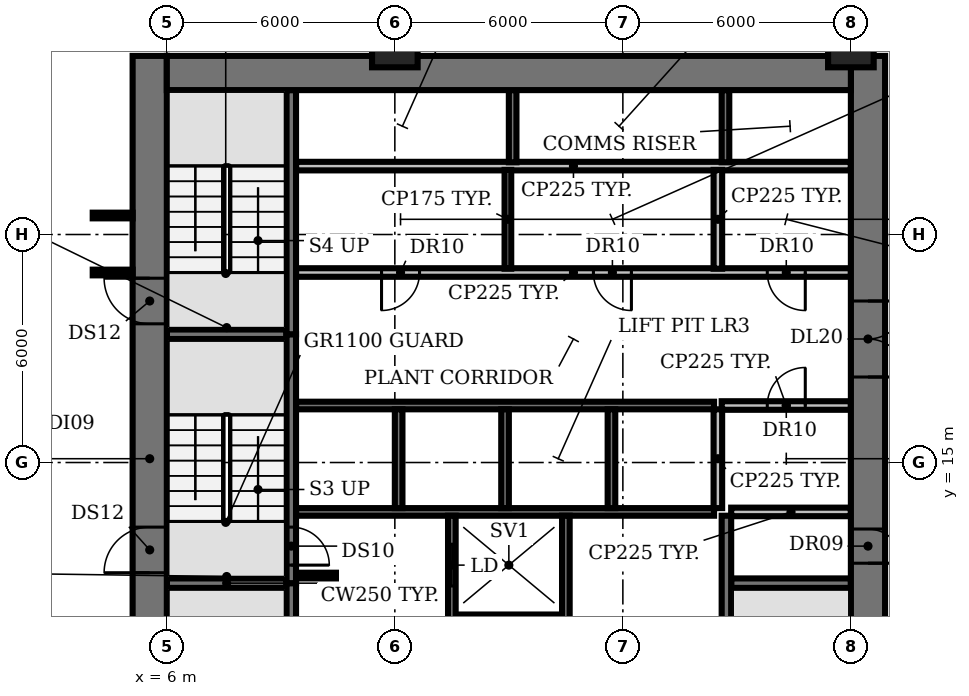
"""IFC4 building model, lengths in metres.
Left out: names, types, materials, properties, quantities, classifications, styles, units other than length and angle.
Written with IfcOpenShell. Run it as: python <this file> out.ifc"""

import sys

from ifc_helpers import new_model, si_unit, direction, frame, frame_2d, origin, origin_2d, place, context, subcontext, project, spatial, rectangle, extrude, element, fill, save


model = new_model("IFC4")
c1 = context("Model", 3, precision=1e-05, world=origin(), true_north=direction((0.0, 1.0)))
c2 = subcontext(c1, "Body", "Model", "MODEL_VIEW")
j1 = project(units=[si_unit("LENGTHUNIT", "METRE"), si_unit("PLANEANGLEUNIT", "RADIAN")], contexts=[c1])
p1 = place(None, origin())
s1 = spatial("IfcSite", under=j1, at=p1, CompositionType="ELEMENT")
p2 = place(p1, origin())
s2 = spatial("IfcBuilding", under=s1, at=p2, CompositionType="ELEMENT")
p3 = place(p2, frame((0.0, 0.0, -6.0)))
s3 = spatial("IfcBuildingStorey", under=s2, at=p3, CompositionType="ELEMENT", Elevation=-6.0)
for number, where, z_axis, x_axis in (
    (1, (12.0, 26.0, -0.3), (0.0, 0.0, 1.0), (1.0, 0.0, 0.0)),
    (2, (24.0, 26.0, -0.3), (0.0, 0.0, 1.0), (1.0, 0.0, 0.0)),
):
    element("IfcColumn", number, at=place(p3, frame(where, z_axis=z_axis, x_axis=x_axis)), inside=s3, PredefinedType="COLUMN", context=c2, shape_type="SweptSolid", body=[
        extrude(rectangle(XDim=1.2, YDim=1.2, at=origin_2d()), origin(), (0.0, 0.0, 1.0), 5.95),
    ])
p4 = place(p3, frame((13.6, 10.9, 0.0), z_axis=(0.0, 0.0, 1.0), x_axis=(1.0, 0.0, 0.0)))
e3 = element("IfcWall", 3, at=p4, inside=s3, PredefinedType="SHEAR", context=c2, shape_type="SweptSolid", body=[
    extrude(rectangle(XDim=2.8, YDim=0.2, at=frame_2d((1.4, 0.0))), origin(), (0.0, 0.0, 1.0), 5.65),
])
for number, where, z_axis, x_axis in (
    (4, (6.0, 11.825, 0.0), (0.0, 0.0, 1.0), (1.0, 0.0, 0.0)),
    (5, (20.85, 11.825, 0.0), (0.0, 0.0, 1.0), (1.0, 0.0, 0.0)),
):
    element("IfcWall", number, at=place(p3, frame(where, z_axis=z_axis, x_axis=x_axis)), inside=s3, PredefinedType="SHEAR", context=c2, shape_type="SweptSolid", body=[
        extrude(rectangle(XDim=3.15, YDim=0.25, at=frame_2d((1.575, 0.0))), origin(), (0.0, 0.0, 1.0), 5.65),
    ])
p5 = place(p3, frame((9.4, 12.025, 0.0), z_axis=(0.0, 0.0, 1.0), x_axis=(1.0, 0.0, 0.0)))
e6 = element("IfcWall", 6, at=p5, inside=s3, PredefinedType="SHEAR", context=c2, shape_type="SweptSolid", body=[
    extrude(rectangle(XDim=1.05, YDim=0.15, at=frame_2d((0.525, 0.0))), origin(), (0.0, 0.0, 1.0), 5.65),
])
p6 = place(p3, frame((9.4, 13.7, 0.0), z_axis=(0.0, 0.0, 1.0), x_axis=(1.0, 0.0, 0.0)))
e7 = element("IfcWall", 7, at=p6, inside=s3, PredefinedType="SHEAR", context=c2, shape_type="SweptSolid", body=[
    extrude(rectangle(XDim=11.0, YDim=0.2, at=frame_2d((5.5, 0.0))), origin(), (0.0, 0.0, 1.0), 5.65),
])
p7 = place(p3, frame((20.85, 13.7, 0.0), z_axis=(0.0, 0.0, 1.0), x_axis=(1.0, 0.0, 0.0)))
e8 = element("IfcWall", 8, at=p7, inside=s3, PredefinedType="PARTITIONING", context=c2, shape_type="SweptSolid", body=[
    extrude(rectangle(XDim=3.15, YDim=0.225, at=frame_2d((1.575, 0.0))), origin(), (0.0, 0.0, 1.0), 5.65),
])
p8 = place(p3, frame((9.4, 16.5, 0.0), z_axis=(0.0, 0.0, 1.0), x_axis=(1.0, 0.0, 0.0)))
e9 = element("IfcWall", 9, at=p8, inside=s3, PredefinedType="SHEAR", context=c2, shape_type="SweptSolid", body=[
    extrude(rectangle(XDim=11.0, YDim=0.2, at=frame_2d((5.5, 0.0))), origin(), (0.0, 0.0, 1.0), 5.65),
])
p9 = place(p3, frame((20.6, 16.5, 0.0), z_axis=(0.0, 0.0, 1.0), x_axis=(1.0, 0.0, 0.0)))
e10 = element("IfcWall", 10, at=p9, inside=s3, PredefinedType="PARTITIONING", context=c2, shape_type="SweptSolid", body=[
    extrude(rectangle(XDim=3.4, YDim=0.225, at=frame_2d((1.7, 0.0))), origin(), (0.0, 0.0, 1.0), 5.65),
])
p10 = place(p9, frame((1.2, 0.0, 0.0)))
e11 = element("IfcOpeningElement", 11, at=p10, cuts=e10, PredefinedType="OPENING", context=c2, shape_type="SweptSolid", body=[
    extrude(rectangle(XDim=1.0, YDim=2.1, at=frame_2d((0.5, 1.05))), frame((0.0, 0.123, 0.0), z_axis=(0.0, -1.0, 0.0), x_axis=(1.0, 0.0, 0.0)), (0.0, 0.0, 1.0), 0.245),
])
p11 = place(p3, frame((6.0, 18.375, 0.0), z_axis=(0.0, 0.0, 1.0), x_axis=(1.0, 0.0, 0.0)))
e12 = element("IfcWall", 12, at=p11, inside=s3, PredefinedType="SHEAR", context=c2, shape_type="SweptSolid", body=[
    extrude(rectangle(XDim=3.15, YDim=0.25, at=frame_2d((1.575, 0.0))), origin(), (0.0, 0.0, 1.0), 5.65),
])
p12 = place(p3, frame((24.0, 20.0, 0.0), z_axis=(0.0, 0.0, 1.0), x_axis=(-1.0, 0.0, 0.0)))
e13 = element("IfcWall", 13, at=p12, inside=s3, PredefinedType="PARTITIONING", context=c2, shape_type="SweptSolid", body=[
    extrude(rectangle(XDim=14.6, YDim=0.225, at=frame_2d((7.3, 0.0))), origin(), (0.0, 0.0, 1.0), 5.65),
])
p13 = place(p12, frame((11.35, 0.0, 0.0)))
e14 = element("IfcOpeningElement", 14, at=p13, cuts=e13, PredefinedType="OPENING", context=c2, shape_type="SweptSolid", body=[
    extrude(rectangle(XDim=1.0, YDim=2.1, at=frame_2d((0.5, 1.05))), frame((0.0, 0.123, 0.0), z_axis=(0.0, -1.0, 0.0), x_axis=(1.0, 0.0, 0.0)), (0.0, 0.0, 1.0), 0.245),
])
p14 = place(p12, frame((5.775, 0.0, 0.0)))
e15 = element("IfcOpeningElement", 15, at=p14, cuts=e13, PredefinedType="OPENING", context=c2, shape_type="SweptSolid", body=[
    extrude(rectangle(XDim=1.0, YDim=2.1, at=frame_2d((0.5, 1.05))), frame((0.0, 0.123, 0.0), z_axis=(0.0, -1.0, 0.0), x_axis=(1.0, 0.0, 0.0)), (0.0, 0.0, 1.0), 0.245),
])
p15 = place(p12, frame((1.2, 0.0, 0.0)))
e16 = element("IfcOpeningElement", 16, at=p15, cuts=e13, PredefinedType="OPENING", context=c2, shape_type="SweptSolid", body=[
    extrude(rectangle(XDim=1.0, YDim=2.1, at=frame_2d((0.5, 1.05))), frame((0.0, 0.123, 0.0), z_axis=(0.0, -1.0, 0.0), x_axis=(1.0, 0.0, 0.0)), (0.0, 0.0, 1.0), 0.245),
])
p16 = place(p3, frame((9.4, 22.8, 0.0), z_axis=(0.0, 0.0, 1.0), x_axis=(1.0, 0.0, 0.0)))
e17 = element("IfcWall", 17, at=p16, inside=s3, PredefinedType="PARTITIONING", context=c2, shape_type="SweptSolid", body=[
    extrude(rectangle(XDim=14.6, YDim=0.225, at=frame_2d((7.3, 0.0))), origin(), (0.0, 0.0, 1.0), 5.65),
])
p17 = place(p3, frame((9.275, 11.825, 0.0), z_axis=(0.0, 0.0, 1.0), x_axis=(0.0, -1.0, 0.0)))
e18 = element("IfcWall", 18, at=p17, inside=s3, PredefinedType="SHEAR", context=c2, shape_type="SweptSolid", body=[
    extrude(rectangle(XDim=6.425, YDim=0.25, at=frame_2d((3.212, 0.0))), origin(), (0.0, 0.0, 1.0), 5.65),
])
p18 = place(p17, frame((5.075, 0.0, 0.0)))
e19 = element("IfcOpeningElement", 19, at=p18, cuts=e18, PredefinedType="OPENING", context=c2, shape_type="SweptSolid", body=[
    extrude(rectangle(XDim=1.0, YDim=2.1, at=frame_2d((0.5, 1.05))), frame((0.0, 0.135, 0.0), z_axis=(0.0, -1.0, 0.0), x_axis=(1.0, 0.0, 0.0)), (0.0, 0.0, 1.0), 0.27),
])
p19 = place(p3, frame((9.275, 18.375, 0.0), z_axis=(0.0, 0.0, 1.0), x_axis=(0.0, -1.0, 0.0)))
e20 = element("IfcWall", 20, at=p19, inside=s3, PredefinedType="SHEAR", context=c2, shape_type="SweptSolid", body=[
    extrude(rectangle(XDim=6.55, YDim=0.25, at=frame_2d((3.275, 0.0))), origin(), (0.0, 0.0, 1.0), 5.65),
])
p20 = place(p19, frame((5.075, 0.0, 0.0)))
e21 = element("IfcOpeningElement", 21, at=p20, cuts=e20, PredefinedType="OPENING", context=c2, shape_type="SweptSolid", body=[
    extrude(rectangle(XDim=1.0, YDim=2.1, at=frame_2d((0.5, 1.05))), frame((0.0, 0.135, 0.0), z_axis=(0.0, -1.0, 0.0), x_axis=(1.0, 0.0, 0.0)), (0.0, 0.0, 1.0), 0.27),
])
p21 = place(p3, frame((9.275, 18.375, 0.0), z_axis=(0.0, 0.0, 1.0), x_axis=(0.0, 1.0, 0.0)))
e22 = element("IfcWall", 22, at=p21, inside=s3, PredefinedType="SHEAR", context=c2, shape_type="SweptSolid", body=[
    extrude(rectangle(XDim=6.425, YDim=0.25, at=frame_2d((3.212, 0.0))), origin(), (0.0, 0.0, 1.0), 5.65),
])
p22 = place(p3, frame((12.1, 13.8, 0.0), z_axis=(0.0, 0.0, 1.0), x_axis=(0.0, 1.0, 0.0)))
e23 = element("IfcWall", 23, at=p22, inside=s3, PredefinedType="SHEAR", context=c2, shape_type="SweptSolid", body=[
    extrude(rectangle(XDim=2.6, YDim=0.2, at=frame_2d((1.3, 0.0))), origin(), (0.0, 0.0, 1.0), 5.65),
])
p23 = place(p3, frame((13.5, 5.4, 0.0), z_axis=(0.0, 0.0, 1.0), x_axis=(0.0, 1.0, 0.0)))
e24 = element("IfcWall", 24, at=p23, inside=s3, PredefinedType="SHEAR", context=c2, shape_type="SweptSolid", body=[
    extrude(rectangle(XDim=8.2, YDim=0.2, at=frame_2d((4.1, 0.0))), origin(), (0.0, 0.0, 1.0), 5.65),
])
p24 = place(p23, frame((0.75, 0.0, 0.0)))
e25 = element("IfcOpeningElement", 25, at=p24, cuts=e24, PredefinedType="OPENING", context=c2, shape_type="SweptSolid", body=[
    extrude(rectangle(XDim=1.1, YDim=2.1, at=frame_2d((0.55, 1.05))), frame((0.0, 0.11, 0.0), z_axis=(0.0, -1.0, 0.0), x_axis=(1.0, 0.0, 0.0)), (0.0, 0.0, 1.0), 0.22),
])
p25 = place(p23, frame((3.55, 0.0, 0.0)))
e26 = element("IfcOpeningElement", 26, at=p25, cuts=e24, PredefinedType="OPENING", context=c2, shape_type="SweptSolid", body=[
    extrude(rectangle(XDim=1.1, YDim=2.1, at=frame_2d((0.55, 1.05))), frame((0.0, 0.11, 0.0), z_axis=(0.0, -1.0, 0.0), x_axis=(1.0, 0.0, 0.0)), (0.0, 0.0, 1.0), 0.22),
])
p26 = place(p23, frame((6.35, 0.0, 0.0)))
e27 = element("IfcOpeningElement", 27, at=p26, cuts=e24, PredefinedType="OPENING", context=c2, shape_type="SweptSolid", body=[
    extrude(rectangle(XDim=1.1, YDim=2.1, at=frame_2d((0.55, 1.05))), frame((0.0, 0.11, 0.0), z_axis=(0.0, -1.0, 0.0), x_axis=(1.0, 0.0, 0.0)), (0.0, 0.0, 1.0), 0.22),
])
p27 = place(p3, frame((14.9, 13.8, 0.0), z_axis=(0.0, 0.0, 1.0), x_axis=(0.0, 1.0, 0.0)))
e28 = element("IfcWall", 28, at=p27, inside=s3, PredefinedType="SHEAR", context=c2, shape_type="SweptSolid", body=[
    extrude(rectangle(XDim=2.6, YDim=0.2, at=frame_2d((1.3, 0.0))), origin(), (0.0, 0.0, 1.0), 5.65),
])
p28 = place(p3, frame((14.975, 20.1, 0.0), z_axis=(0.0, 0.0, 1.0), x_axis=(0.0, 1.0, 0.0)))
e29 = element("IfcWall", 29, at=p28, inside=s3, PredefinedType="PARTITIONING", context=c2, shape_type="SweptSolid", body=[
    extrude(rectangle(XDim=2.6, YDim=0.175, at=frame_2d((1.3, 0.0))), origin(), (0.0, 0.0, 1.0), 5.65),
])
p29 = place(p3, frame((15.1, 22.9, 0.0), z_axis=(0.0, 0.0, 1.0), x_axis=(0.0, 1.0, 0.0)))
e30 = element("IfcWall", 30, at=p29, inside=s3, PredefinedType="SHEAR", context=c2, shape_type="SweptSolid", body=[
    extrude(rectangle(XDim=1.9, YDim=0.2, at=frame_2d((0.95, 0.0))), origin(), (0.0, 0.0, 1.0), 5.65),
])
p30 = place(p3, frame((16.5, 5.4, 0.0), z_axis=(0.0, 0.0, 1.0), x_axis=(0.0, 1.0, 0.0)))
e31 = element("IfcWall", 31, at=p30, inside=s3, PredefinedType="SHEAR", context=c2, shape_type="SweptSolid", body=[
    extrude(rectangle(XDim=8.2, YDim=0.2, at=frame_2d((4.1, 0.0))), origin(), (0.0, 0.0, 1.0), 5.65),
])
p31 = place(p3, frame((17.7, 13.8, 0.0), z_axis=(0.0, 0.0, 1.0), x_axis=(0.0, 1.0, 0.0)))
e32 = element("IfcWall", 32, at=p31, inside=s3, PredefinedType="SHEAR", context=c2, shape_type="SweptSolid", body=[
    extrude(rectangle(XDim=2.6, YDim=0.2, at=frame_2d((1.3, 0.0))), origin(), (0.0, 0.0, 1.0), 5.65),
])
for number, where, z_axis, x_axis in (
    (33, (20.5, 13.8, 0.0), (0.0, 0.0, 1.0), (0.0, 1.0, 0.0)),
    (34, (20.5, 20.1, 0.0), (0.0, 0.0, 1.0), (0.0, 1.0, 0.0)),
):
    element("IfcWall", number, at=place(p3, frame(where, z_axis=z_axis, x_axis=x_axis)), inside=s3, PredefinedType="PARTITIONING", context=c2, shape_type="SweptSolid", body=[
        extrude(rectangle(XDim=2.6, YDim=0.225, at=frame_2d((1.3, 0.0))), origin(), (0.0, 0.0, 1.0), 5.65),
    ])
p32 = place(p3, frame((20.7, 22.9, 0.0), z_axis=(0.0, 0.0, 1.0), x_axis=(0.0, 1.0, 0.0)))
e35 = element("IfcWall", 35, at=p32, inside=s3, PredefinedType="SHEAR", context=c2, shape_type="SweptSolid", body=[
    extrude(rectangle(XDim=1.9, YDim=0.2, at=frame_2d((0.95, 0.0))), origin(), (0.0, 0.0, 1.0), 5.65),
])
p33 = place(p3, frame((20.725, 5.4, 0.0), z_axis=(0.0, 0.0, 1.0), x_axis=(0.0, 1.0, 0.0)))
e36 = element("IfcWall", 36, at=p33, inside=s3, PredefinedType="SHEAR", context=c2, shape_type="SweptSolid", body=[
    extrude(rectangle(XDim=8.2, YDim=0.25, at=frame_2d((4.1, 0.0))), origin(), (0.0, 0.0, 1.0), 5.65),
])
p34 = place(p3, frame((5.55, 4.5, 0.0), z_axis=(0.0, 0.0, 1.0), x_axis=(0.0, 1.0, 0.0)))
e37 = element("IfcWall", 37, at=p34, inside=s3, PredefinedType="SHEAR", context=c2, shape_type="SweptSolid", body=[
    extrude(rectangle(XDim=21.2, YDim=0.9, at=frame_2d((10.6, 0.0))), origin(), (0.0, 0.0, 1.0), 5.65),
])
p35 = place(p34, frame((7.6, 0.0, 0.0)))
e38 = element("IfcOpeningElement", 38, at=p35, cuts=e37, PredefinedType="OPENING", context=c2, shape_type="SweptSolid", body=[
    extrude(rectangle(XDim=1.2, YDim=2.1, at=frame_2d((0.6, 1.05))), frame((0.0, 0.46, 0.0), z_axis=(0.0, -1.0, 0.0), x_axis=(1.0, 0.0, 0.0)), (0.0, 0.0, 1.0), 0.92),
])
p36 = place(p34, frame((14.15, 0.0, 0.0)))
e39 = element("IfcOpeningElement", 39, at=p36, cuts=e37, PredefinedType="OPENING", context=c2, shape_type="SweptSolid", body=[
    extrude(rectangle(XDim=1.2, YDim=2.1, at=frame_2d((0.6, 1.05))), frame((0.0, 0.46, 0.0), z_axis=(0.0, -1.0, 0.0), x_axis=(1.0, 0.0, 0.0)), (0.0, 0.0, 1.0), 0.92),
])
p37 = place(p3, frame((24.45, 25.7, 0.0), z_axis=(0.0, 0.0, 1.0), x_axis=(0.0, -1.0, 0.0)))
e40 = element("IfcWall", 40, at=p37, inside=s3, PredefinedType="SHEAR", context=c2, shape_type="SweptSolid", body=[
    extrude(rectangle(XDim=21.2, YDim=0.9, at=frame_2d((10.6, 0.0))), origin(), (0.0, 0.0, 1.0), 5.65),
])
p38 = place(p37, frame((12.45, 0.0, 0.0)))
e41 = element("IfcOpeningElement", 41, at=p38, cuts=e40, PredefinedType="OPENING", context=c2, shape_type="SweptSolid", body=[
    extrude(rectangle(XDim=0.9, YDim=2.1, at=frame_2d((0.45, 1.05))), frame((0.0, 0.46, 0.0), z_axis=(0.0, -1.0, 0.0), x_axis=(1.0, 0.0, 0.0)), (0.0, 0.0, 1.0), 0.92),
])
p39 = place(p37, frame((6.45, 0.0, 0.0)))
e42 = element("IfcOpeningElement", 42, at=p39, cuts=e40, PredefinedType="OPENING", context=c2, shape_type="SweptSolid", body=[
    extrude(rectangle(XDim=2.0, YDim=2.1, at=frame_2d((1.0, 1.05))), frame((0.0, 0.46, 0.0), z_axis=(0.0, -1.0, 0.0), x_axis=(1.0, 0.0, 0.0)), (0.0, 0.0, 1.0), 0.92),
])
p40 = place(p3, frame((6.0, 25.25, 0.0), z_axis=(0.0, 0.0, 1.0), x_axis=(1.0, 0.0, 0.0)))
e43 = element("IfcWall", 43, at=p40, inside=s3, PredefinedType="SHEAR", context=c2, shape_type="SweptSolid", body=[
    extrude(rectangle(XDim=18.0, YDim=0.9, at=frame_2d((9.0, 0.0))), origin(), (0.0, 0.0, 1.0), 5.65),
])
for number, where, z_axis, x_axis in (
    (44, (4.05, 20.0, 0.0), (0.0, 0.0, 1.0), (1.0, 0.0, 0.0)),
    (45, (4.05, 21.5, 0.0), (0.0, 0.0, 1.0), (1.0, 0.0, 0.0)),
):
    element("IfcWall", number, at=place(p3, frame(where, z_axis=z_axis, x_axis=x_axis)), inside=s3, PredefinedType="PARTITIONING", context=c2, shape_type="SweptSolid", body=[
        extrude(rectangle(XDim=1.05, YDim=0.15, at=frame_2d((0.525, 0.0))), origin(), (0.0, 0.0, 1.0), 4.7),
    ])
p41 = place(p10, origin())
e46 = element("IfcDoor", 46, at=p41, inside=s3, OperationType="SINGLE_SWING_RIGHT", PredefinedType="DOOR", context=c2, shape_type="SweptSolid", body=[
    extrude(rectangle(XDim=1.0, YDim=2.1, at=frame_2d((0.5, 1.05))), frame((0.0, 0.025, 0.0), z_axis=(0.0, -1.0, 0.0), x_axis=(1.0, 0.0, 0.0)), (0.0, 0.0, 1.0), 0.05),
])
fill(e11, e46)
p42 = place(p13, origin())
e47 = element("IfcDoor", 47, at=p42, inside=s3, OperationType="SINGLE_SWING_RIGHT", PredefinedType="DOOR", context=c2, shape_type="SweptSolid", body=[
    extrude(rectangle(XDim=1.0, YDim=2.1, at=frame_2d((0.5, 1.05))), frame((0.0, 0.025, 0.0), z_axis=(0.0, -1.0, 0.0), x_axis=(1.0, 0.0, 0.0)), (0.0, 0.0, 1.0), 0.05),
])
fill(e14, e47)
p43 = place(p14, origin())
e48 = element("IfcDoor", 48, at=p43, inside=s3, OperationType="SINGLE_SWING_LEFT", PredefinedType="DOOR", context=c2, shape_type="SweptSolid", body=[
    extrude(rectangle(XDim=1.0, YDim=2.1, at=frame_2d((0.5, 1.05))), frame((0.0, 0.025, 0.0), z_axis=(0.0, -1.0, 0.0), x_axis=(1.0, 0.0, 0.0)), (0.0, 0.0, 1.0), 0.05),
])
fill(e15, e48)
p44 = place(p15, origin())
e49 = element("IfcDoor", 49, at=p44, inside=s3, OperationType="SINGLE_SWING_LEFT", PredefinedType="DOOR", context=c2, shape_type="SweptSolid", body=[
    extrude(rectangle(XDim=1.0, YDim=2.1, at=frame_2d((0.5, 1.05))), frame((0.0, 0.025, 0.0), z_axis=(0.0, -1.0, 0.0), x_axis=(1.0, 0.0, 0.0)), (0.0, 0.0, 1.0), 0.05),
])
fill(e16, e49)
p45 = place(p20, origin())
e50 = element("IfcDoor", 50, at=p45, inside=s3, OperationType="SINGLE_SWING_RIGHT", PredefinedType="DOOR", context=c2, shape_type="SweptSolid", body=[
    extrude(rectangle(XDim=1.0, YDim=2.1, at=frame_2d((0.5, 1.05))), frame((0.0, 0.025, 0.0), z_axis=(0.0, -1.0, 0.0), x_axis=(1.0, 0.0, 0.0)), (0.0, 0.0, 1.0), 0.05),
])
fill(e21, e50)
p46 = place(p26, origin())
e51 = element("IfcDoor", 51, at=p46, inside=s3, OperationType="DOUBLE_DOOR_SLIDING", PredefinedType="DOOR", context=c2, shape_type="SweptSolid", body=[
    extrude(rectangle(XDim=1.1, YDim=2.1, at=frame_2d((0.55, 1.05))), frame((0.0, 0.025, 0.0), z_axis=(0.0, -1.0, 0.0), x_axis=(1.0, 0.0, 0.0)), (0.0, 0.0, 1.0), 0.05),
])
fill(e27, e51)
p47 = place(p35, origin())
e52 = element("IfcDoor", 52, at=p47, inside=s3, OperationType="SINGLE_SWING_LEFT", PredefinedType="DOOR", context=c2, shape_type="SweptSolid", body=[
    extrude(rectangle(XDim=1.2, YDim=2.1, at=frame_2d((0.6, 1.05))), frame((0.0, 0.025, 0.0), z_axis=(0.0, -1.0, 0.0), x_axis=(1.0, 0.0, 0.0)), (0.0, 0.0, 1.0), 0.05),
])
fill(e38, e52)
p48 = place(p36, origin())
e53 = element("IfcDoor", 53, at=p48, inside=s3, OperationType="SINGLE_SWING_RIGHT", PredefinedType="DOOR", context=c2, shape_type="SweptSolid", body=[
    extrude(rectangle(XDim=1.2, YDim=2.1, at=frame_2d((0.6, 1.05))), frame((0.0, 0.025, 0.0), z_axis=(0.0, -1.0, 0.0), x_axis=(1.0, 0.0, 0.0)), (0.0, 0.0, 1.0), 0.05),
])
fill(e39, e53)
p49 = place(p38, origin())
e54 = element("IfcDoor", 54, at=p49, inside=s3, OperationType="SINGLE_SWING_RIGHT", PredefinedType="DOOR", context=c2, shape_type="SweptSolid", body=[
    extrude(rectangle(XDim=0.9, YDim=2.1, at=frame_2d((0.45, 1.05))), frame((0.0, -0.39, 0.0), z_axis=(0.0, -1.0, 0.0), x_axis=(1.0, 0.0, 0.0)), (0.0, 0.0, 1.0), 0.05),
])
fill(e41, e54)
p50 = place(p39, origin())
e55 = element("IfcDoor", 55, at=p50, inside=s3, OperationType="DOUBLE_DOOR_SINGLE_SWING", PredefinedType="DOOR", context=c2, shape_type="SweptSolid", body=[
    extrude(rectangle(XDim=2.0, YDim=2.1, at=frame_2d((1.0, 1.05))), frame((0.0, 0.025, 0.0), z_axis=(0.0, -1.0, 0.0), x_axis=(1.0, 0.0, 0.0)), (0.0, 0.0, 1.0), 0.05),
])
fill(e42, e55)
save(model, sys.argv[1])
